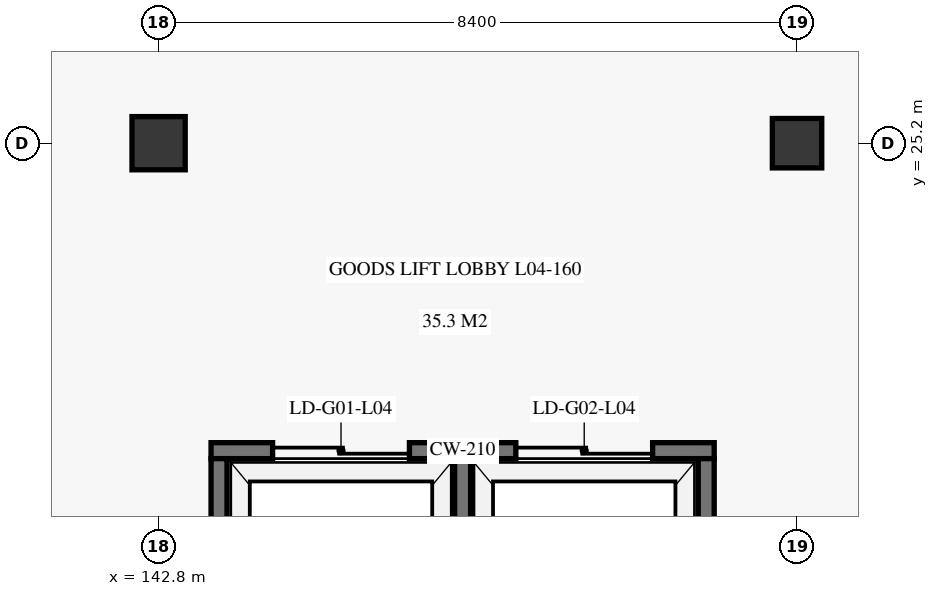
"""IFC4 building model, lengths in metres.
Left out: names, types, materials, properties, quantities, classifications, styles, units other than length and angle.
Written with IfcOpenShell. Run it as: python <this file> out.ifc"""

import sys

from ifc_helpers import new_model, si_unit, direction, frame, frame_2d, origin, origin_2d, place, context, subcontext, project, spatial, rectangle, extrude, element, fill, save


model = new_model("IFC4")
c1 = context("Model", 3, precision=1e-05, world=origin(), true_north=direction((0.0, 1.0)))
c2 = subcontext(c1, "Body", "Model", "MODEL_VIEW")
j1 = project(units=[si_unit("LENGTHUNIT", "METRE"), si_unit("PLANEANGLEUNIT", "RADIAN")], contexts=[c1])
p1 = place(None, origin())
s1 = spatial("IfcSite", under=j1, at=p1, CompositionType="ELEMENT")
p2 = place(p1, origin())
s2 = spatial("IfcBuilding", under=s1, at=p2, CompositionType="ELEMENT")
p3 = place(p2, frame((0.0, 0.0, 16.8)))
s3 = spatial("IfcBuildingStorey", under=s2, at=p3, CompositionType="ELEMENT", Elevation=16.8)
p4 = place(p3, frame((142.8, 25.2, 0.0), z_axis=(0.0, 0.0, 1.0), x_axis=(1.0, 0.0, 0.0)))
e1 = element("IfcColumn", 1, at=p4, inside=s3, PredefinedType="COLUMN", context=c2, shape_type="SweptSolid", body=[
    extrude(rectangle(XDim=0.7, YDim=0.7, at=origin_2d()), origin(), (0.0, 0.0, 1.0), 5.1),
])
p5 = place(p3, frame((151.2, 25.2, 0.0), z_axis=(0.0, 0.0, 1.0), x_axis=(1.0, 0.0, 0.0)))
e2 = element("IfcColumn", 2, at=p5, inside=s3, PredefinedType="COLUMN", context=c2, shape_type="SweptSolid", body=[
    extrude(rectangle(XDim=0.65, YDim=0.65, at=origin_2d()), origin(), (0.0, 0.0, 1.0), 5.1),
])
p6 = place(p3, frame((143.49, 21.155, 0.0), z_axis=(0.0, 0.0, 1.0), x_axis=(1.0, 0.0, 0.0)))
e3 = element("IfcWall", 3, at=p6, inside=s3, PredefinedType="SHEAR", context=c2, shape_type="SweptSolid", body=[
    extrude(rectangle(XDim=6.62, YDim=0.21, at=frame_2d((3.31, 0.0))), origin(), (0.0, 0.0, 1.0), 5.1),
])
p7 = place(p6, frame((0.81, 0.0, 0.0)))
e4 = element("IfcOpeningElement", 4, at=p7, cuts=e3, PredefinedType="OPENING", context=c2, shape_type="SweptSolid", body=[
    extrude(rectangle(XDim=1.8, YDim=2.45, at=frame_2d((0.9, 1.225))), frame((0.0, 0.115, 0.0), z_axis=(0.0, -1.0, 0.0), x_axis=(1.0, 0.0, 0.0)), (0.0, 0.0, 1.0), 0.23),
])
p8 = place(p6, frame((4.01, 0.0, 0.0)))
e5 = element("IfcOpeningElement", 5, at=p8, cuts=e3, PredefinedType="OPENING", context=c2, shape_type="SweptSolid", body=[
    extrude(rectangle(XDim=1.8, YDim=2.45, at=frame_2d((0.9, 1.225))), frame((0.0, 0.115, 0.0), z_axis=(0.0, -1.0, 0.0), x_axis=(1.0, 0.0, 0.0)), (0.0, 0.0, 1.0), 0.23),
])
for number, where, z_axis, x_axis in (
    (6, (143.595, 17.45, 0.0), (0.0, 0.0, 1.0), (0.0, 1.0, 0.0)),
    (7, (150.005, 17.45, 0.0), (0.0, 0.0, 1.0), (0.0, 1.0, 0.0)),
    (8, (146.8, 17.45, 0.0), (0.0, 0.0, 1.0), (0.0, 1.0, 0.0)),
):
    element("IfcWall", number, at=place(p3, frame(where, z_axis=z_axis, x_axis=x_axis)), inside=s3, PredefinedType="SHEAR", context=c2, shape_type="SweptSolid", body=[
        extrude(rectangle(XDim=3.6, YDim=0.21, at=frame_2d((1.8, 0.0))), origin(), (0.0, 0.0, 1.0), 5.1),
    ])
p9 = place(p7, origin())
e9 = element("IfcDoor", 9, at=p9, inside=s3, OperationType="DOUBLE_DOOR_SLIDING", PredefinedType="DOOR", context=c2, shape_type="SweptSolid", body=[
    extrude(rectangle(XDim=1.8, YDim=2.45, at=frame_2d((0.9, 1.225))), frame((0.0, 0.025, 0.0), z_axis=(0.0, -1.0, 0.0), x_axis=(1.0, 0.0, 0.0)), (0.0, 0.0, 1.0), 0.05),
])
fill(e4, e9)
p10 = place(p8, origin())
e10 = element("IfcDoor", 10, at=p10, inside=s3, OperationType="DOUBLE_DOOR_SLIDING", PredefinedType="DOOR", context=c2, shape_type="SweptSolid", body=[
    extrude(rectangle(XDim=1.8, YDim=2.45, at=frame_2d((0.9, 1.225))), frame((0.0, 0.025, 0.0), z_axis=(0.0, -1.0, 0.0), x_axis=(1.0, 0.0, 0.0)), (0.0, 0.0, 1.0), 0.05),
])
fill(e5, e10)
save(model, sys.argv[1])
